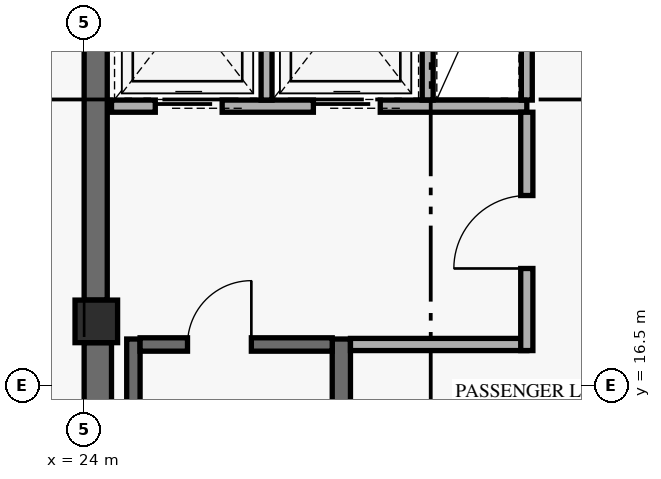
"""IFC4 building model, lengths in metres.
Left out: names, types, materials, properties, quantities, classifications, styles, units other than length and angle.
Written with IfcOpenShell. Run it as: python <this file> out.ifc"""

import sys

from ifc_helpers import new_model, si_unit, direction, frame, frame_2d, origin, origin_2d, place, context, subcontext, project, spatial, rectangle, extrude, element, fill, save


model = new_model("IFC4")
c1 = context("Model", 3, precision=1e-05, world=origin(), true_north=direction((0.0, 1.0)))
c2 = subcontext(c1, "Body", "Model", "MODEL_VIEW")
j1 = project(units=[si_unit("LENGTHUNIT", "METRE"), si_unit("PLANEANGLEUNIT", "RADIAN")], contexts=[c1])
p1 = place(None, origin())
s1 = spatial("IfcSite", under=j1, at=p1, CompositionType="ELEMENT")
p2 = place(p1, origin())
s2 = spatial("IfcBuilding", under=s1, at=p2, CompositionType="ELEMENT")
p3 = place(p2, frame((0.0, 0.0, 188.4)))
s3 = spatial("IfcBuildingStorey", under=s2, at=p3, CompositionType="ELEMENT", Elevation=188.4)
p4 = place(p3, frame((24.225, 9.6, 0.0), z_axis=(0.0, 0.0, 1.0), x_axis=(0.0, 1.0, 0.0)))
e1 = element("IfcWall", 1, at=p4, inside=s3, PredefinedType="SHEAR", context=c2, shape_type="SweptSolid", body=[
    extrude(rectangle(XDim=7.6, YDim=0.45, at=frame_2d((3.8, 0.0))), origin(), (0.0, 0.0, 1.0), 2.738),
])
p5 = place(p3, frame((24.19, 17.9, 0.0), z_axis=(0.0, 0.0, 1.0), x_axis=(0.0, 1.0, 0.0)))
e2 = element("IfcWall", 2, at=p5, inside=s3, PredefinedType="SHEAR", context=c2, shape_type="SweptSolid", body=[
    extrude(rectangle(XDim=11.95, YDim=0.38, at=frame_2d((5.975, 0.0))), origin(), (0.0, 0.0, 1.0), 2.738),
])
p6 = place(p3, frame((24.81, 9.5, 0.0), z_axis=(0.0, 0.0, 1.0), x_axis=(0.0, 1.0, 0.0)))
e3 = element("IfcWall", 3, at=p6, inside=s3, PredefinedType="SHEAR", context=c2, shape_type="SweptSolid", body=[
    extrude(rectangle(XDim=7.76, YDim=0.22, at=frame_2d((3.88, 0.0))), origin(), (0.0, 0.0, 1.0), 3.35),
])
p7 = place(p3, frame((28.23, 9.5, 0.0), z_axis=(0.0, 0.0, 1.0), x_axis=(0.0, 1.0, 0.0)))
e4 = element("IfcWall", 4, at=p7, inside=s3, PredefinedType="SHEAR", context=c2, shape_type="SweptSolid", body=[
    extrude(rectangle(XDim=7.76, YDim=0.3, at=frame_2d((3.88, 0.0))), origin(), (0.0, 0.0, 1.0), 3.35),
])
p8 = place(p3, frame((24.92, 17.17, 0.0), z_axis=(0.0, 0.0, 1.0), x_axis=(1.0, 0.0, 0.0)))
e5 = element("IfcWall", 5, at=p8, inside=s3, PredefinedType="SHEAR", context=c2, shape_type="SweptSolid", body=[
    extrude(rectangle(XDim=3.16, YDim=0.22, at=frame_2d((1.58, 0.0))), origin(), (0.0, 0.0, 1.0), 3.35),
])
p9 = place(p8, frame((0.78, 0.0, 0.0)))
e6 = element("IfcOpeningElement", 6, at=p9, cuts=e5, PredefinedType="OPENING", context=c2, shape_type="SweptSolid", body=[
    extrude(rectangle(XDim=1.05, YDim=2.15, at=frame_2d((0.525, 1.075))), frame((0.0, 0.12, 0.0), z_axis=(0.0, -1.0, 0.0), x_axis=(1.0, 0.0, 0.0)), (0.0, 0.0, 1.0), 0.24),
])
p10 = place(p3, frame((24.2, 17.55, 0.0), z_axis=(0.0, 0.0, 1.0), x_axis=(1.0, 0.0, 0.0)))
e7 = element("IfcColumn", 7, at=p10, inside=s3, PredefinedType="COLUMN", context=c2, shape_type="SweptSolid", body=[
    extrude(rectangle(XDim=0.7, YDim=0.7, at=origin_2d()), origin(), (0.0, 0.0, 1.0), 3.6),
])
p11 = place(p3, frame((24.45, 21.09, 0.0), z_axis=(0.0, 0.0, 1.0), x_axis=(1.0, 0.0, 0.0)))
e8 = element("IfcWall", 8, at=p11, inside=s3, PredefinedType="STANDARD", context=c2, shape_type="SweptSolid", body=[
    extrude(rectangle(XDim=6.83, YDim=0.2, at=frame_2d((3.415, 0.0))), origin(), (0.0, 0.0, 1.0), 3.35),
])
p12 = place(p11, frame((0.72, 0.0, 0.0)))
e9 = element("IfcOpeningElement", 9, at=p12, cuts=e8, PredefinedType="OPENING", context=c2, shape_type="SweptSolid", body=[
    extrude(rectangle(XDim=1.1, YDim=2.2, at=frame_2d((0.55, 1.1))), frame((0.0, 0.11, 0.0), z_axis=(0.0, -1.0, 0.0), x_axis=(1.0, 0.0, 0.0)), (0.0, 0.0, 1.0), 0.22),
])
p13 = place(p11, frame((3.32, 0.0, 0.0)))
e10 = element("IfcOpeningElement", 10, at=p13, cuts=e8, PredefinedType="OPENING", context=c2, shape_type="SweptSolid", body=[
    extrude(rectangle(XDim=1.1, YDim=2.2, at=frame_2d((0.55, 1.1))), frame((0.0, 0.11, 0.0), z_axis=(0.0, -1.0, 0.0), x_axis=(1.0, 0.0, 0.0)), (0.0, 0.0, 1.0), 0.22),
])
p14 = place(p3, frame((28.38, 17.17, 0.0), z_axis=(0.0, 0.0, 1.0), x_axis=(1.0, 0.0, 0.0)))
e11 = element("IfcWall", 11, at=p14, inside=s3, PredefinedType="STANDARD", context=c2, shape_type="SweptSolid", body=[
    extrude(rectangle(XDim=2.9, YDim=0.2, at=frame_2d((1.45, 0.0))), origin(), (0.0, 0.0, 1.0), 3.35),
])
p15 = place(p3, frame((31.28, 17.07, 0.0), z_axis=(0.0, 0.0, 1.0), x_axis=(0.0, 1.0, 0.0)))
e12 = element("IfcWall", 12, at=p15, inside=s3, PredefinedType="STANDARD", context=c2, shape_type="SweptSolid", body=[
    extrude(rectangle(XDim=3.92, YDim=0.2, at=frame_2d((1.96, 0.0))), origin(), (0.0, 0.0, 1.0), 2.72),
])
p16 = place(p15, frame((1.35, 0.0, 0.0)))
e13 = element("IfcOpeningElement", 13, at=p16, cuts=e12, PredefinedType="OPENING", context=c2, shape_type="SweptSolid", body=[
    extrude(rectangle(XDim=1.2, YDim=2.15, at=frame_2d((0.6, 1.075))), frame((0.0, 0.11, 0.0), z_axis=(0.0, -1.0, 0.0), x_axis=(1.0, 0.0, 0.0)), (0.0, 0.0, 1.0), 0.22),
])
p17 = place(p3, frame((27.0, 21.19, 0.0), z_axis=(0.0, 0.0, 1.0), x_axis=(0.0, 1.0, 0.0)))
e14 = element("IfcWall", 14, at=p17, inside=s3, PredefinedType="STANDARD", context=c2, shape_type="SweptSolid", body=[
    extrude(rectangle(XDim=3.11, YDim=0.18, at=frame_2d((1.555, 0.0))), origin(), (0.0, 0.0, 1.0), 3.35),
])
for number, where, z_axis, x_axis in (
    (15, (29.65, 21.19, 0.0), (0.0, 0.0, 1.0), (0.0, 1.0, 0.0)),
    (16, (31.28, 21.19, 0.0), (0.0, 0.0, 1.0), (0.0, 1.0, 0.0)),
):
    element("IfcWall", number, at=place(p3, frame(where, z_axis=z_axis, x_axis=x_axis)), inside=s3, PredefinedType="STANDARD", context=c2, shape_type="SweptSolid", body=[
        extrude(rectangle(XDim=3.02, YDim=0.18, at=frame_2d((1.51, 0.0))), origin(), (0.0, 0.0, 1.0), 3.35),
    ])
p18 = place(p9, frame((1.05, 0.0, 0.0), z_axis=(0.0, 0.0, 1.0), x_axis=(-1.0, 0.0, 0.0)))
e17 = element("IfcDoor", 17, at=p18, inside=s3, OperationType="SINGLE_SWING_LEFT", PredefinedType="DOOR", context=c2, shape_type="SweptSolid", body=[
    extrude(rectangle(XDim=1.05, YDim=2.15, at=frame_2d((0.525, 1.075))), frame((0.0, 0.025, 0.0), z_axis=(0.0, -1.0, 0.0), x_axis=(1.0, 0.0, 0.0)), (0.0, 0.0, 1.0), 0.05),
])
fill(e6, e17)
p19 = place(p12, origin())
e18 = element("IfcDoor", 18, at=p19, inside=s3, OperationType="SLIDING_TO_LEFT", PredefinedType="DOOR", context=c2, shape_type="SweptSolid", body=[
    extrude(rectangle(XDim=1.1, YDim=2.2, at=frame_2d((0.55, 1.1))), frame((0.0, 0.025, 0.0), z_axis=(0.0, -1.0, 0.0), x_axis=(1.0, 0.0, 0.0)), (0.0, 0.0, 1.0), 0.05),
])
fill(e9, e18)
p20 = place(p13, origin())
e19 = element("IfcDoor", 19, at=p20, inside=s3, OperationType="SLIDING_TO_LEFT", PredefinedType="DOOR", context=c2, shape_type="SweptSolid", body=[
    extrude(rectangle(XDim=1.1, YDim=2.2, at=frame_2d((0.55, 1.1))), frame((0.0, 0.025, 0.0), z_axis=(0.0, -1.0, 0.0), x_axis=(1.0, 0.0, 0.0)), (0.0, 0.0, 1.0), 0.05),
])
fill(e10, e19)
p21 = place(p16, origin())
e20 = element("IfcDoor", 20, at=p21, inside=s3, OperationType="SINGLE_SWING_LEFT", PredefinedType="DOOR", context=c2, shape_type="SweptSolid", body=[
    extrude(rectangle(XDim=1.2, YDim=2.15, at=frame_2d((0.6, 1.075))), frame((0.0, 0.025, 0.0), z_axis=(0.0, -1.0, 0.0), x_axis=(1.0, 0.0, 0.0)), (0.0, 0.0, 1.0), 0.05),
])
fill(e13, e20)
save(model, sys.argv[1])
